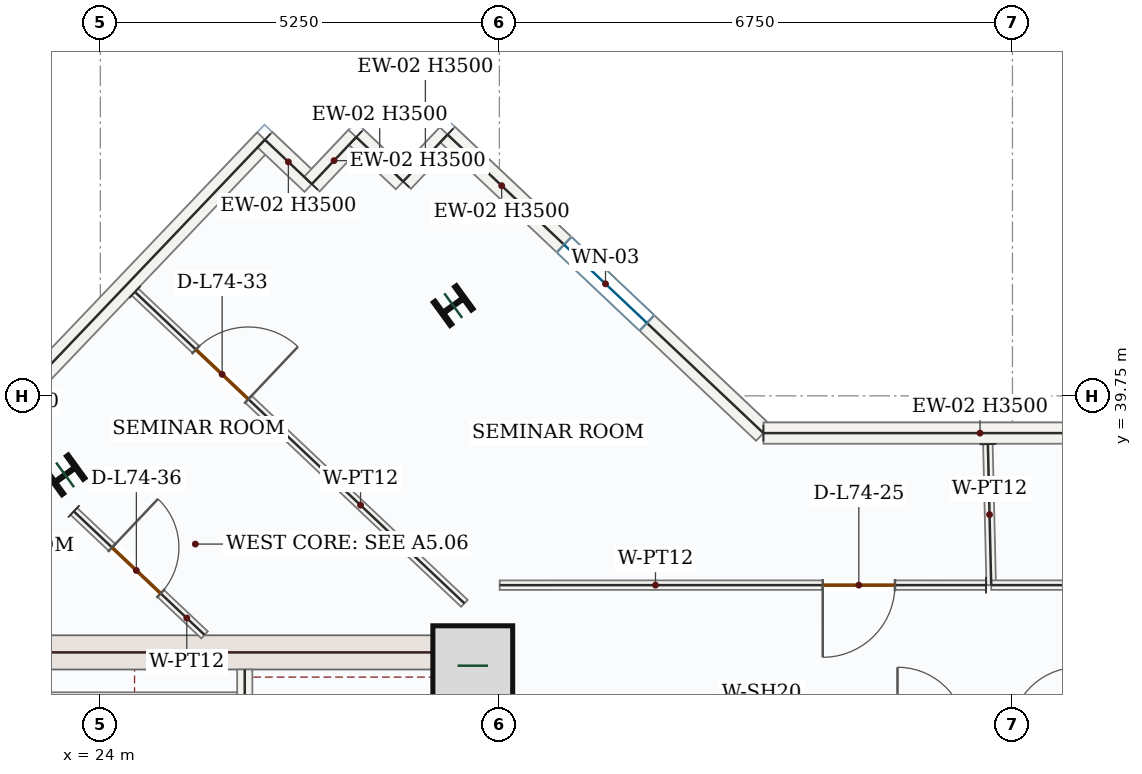
"""IFC4 building model, lengths in metres.
Left out: names, types, materials, properties, quantities, classifications, styles, units other than length and angle.
Written with IfcOpenShell. Run it as: python <this file> out.ifc"""

import sys

from ifc_helpers import new_model, si_unit, direction, frame, frame_2d, origin, origin_2d, place, context, subcontext, project, spatial, rectangle, i_section, extrude, source, transform, mapped, element, fill, save


model = new_model("IFC4")
c1 = context("Model", 3, precision=1e-05, world=origin(), true_north=direction((0.0, 1.0)))
c2 = subcontext(c1, "Body", "Model", "MODEL_VIEW")
j1 = project(units=[si_unit("LENGTHUNIT", "METRE"), si_unit("PLANEANGLEUNIT", "RADIAN")], contexts=[c1])
p1 = place(None, origin())
s1 = spatial("IfcSite", under=j1, at=p1, CompositionType="ELEMENT")
p2 = place(p1, origin())
s2 = spatial("IfcBuilding", under=s1, at=p2, CompositionType="ELEMENT")
p3 = place(p2, frame((0.0, 0.0, 306.6)))
s3 = spatial("IfcBuildingStorey", under=s2, at=p3, CompositionType="ELEMENT", Elevation=306.6)
p4 = place(p3, frame((29.025, 28.05, 0.0), z_axis=(0.0, 0.0, 1.0), x_axis=(0.0, 1.0, 0.0)))
e1 = element("IfcWall", 1, at=p4, inside=s3, PredefinedType="SHEAR", context=c2, shape_type="SweptSolid", body=[
    extrude(rectangle(XDim=8.55, YDim=0.45, at=frame_2d((4.275, 0.0))), origin(), (0.0, 0.0, 1.0), 3.5),
])
p5 = place(p4, frame((1.5, 0.0, 0.0)))
e2 = element("IfcOpeningElement", 2, at=p5, cuts=e1, PredefinedType="OPENING", context=c2, shape_type="SweptSolid", body=[
    extrude(rectangle(XDim=1.1, YDim=2.2, at=frame_2d((0.55, 1.1))), frame((0.0, 0.235, 0.0), z_axis=(0.0, -1.0, 0.0), x_axis=(1.0, 0.0, 0.0)), (0.0, 0.0, 1.0), 0.47),
])
m1 = source(origin(), c2, "Body", "SweptSolid", [
    extrude(rectangle(XDim=7.1, YDim=0.45, at=frame_2d((3.55, 0.0))), origin(), (0.0, 0.0, 1.0), 3.5),
])
p6 = place(p3, frame((21.7, 36.375, 0.0), z_axis=(0.0, 0.0, 1.0), x_axis=(1.0, 0.0, 0.0)))
e3 = element("IfcWall", 3, at=p6, inside=s3, PredefinedType="SHEAR", context=c2, shape_type="MappedRepresentation", body=[
    mapped(m1, transform((0.0, 0.0, 0.0), x_axis=(1.0, 0.0, 0.0), y_axis=(0.0, 1.0, 0.0), z_axis=(0.0, 0.0, 1.0), scale=1.0)),
])
m2 = source(origin(), c2, "Body", "SweptSolid", [
    extrude(rectangle(XDim=1.05, YDim=1.05, at=origin_2d()), origin(), (0.0, 0.0, 1.0), 3.75),
])
p7 = place(p3, frame((28.9, 36.2, 0.0), z_axis=(0.0, 0.0, 1.0), x_axis=(1.0, 0.0, 0.0)))
e4 = element("IfcColumn", 4, at=p7, inside=s3, PredefinedType="COLUMN", context=c2, shape_type="MappedRepresentation", body=[
    mapped(m2, transform((0.0, 0.0, 0.0), x_axis=(1.0, 0.0, 0.0), y_axis=(0.0, 1.0, 0.0), z_axis=(0.0, 0.0, 1.0), scale=1.0)),
])
m3 = source(origin(), c2, "Body", "SweptSolid", [
    extrude(i_section(OverallWidth=0.374, OverallDepth=0.372, WebThickness=0.016, FlangeThickness=0.026, FilletRadius=0.018, at=origin_2d()), origin(), (0.0, 0.0, 1.0), 3.75),
])
for number, where, z_axis, x_axis in (
    (5, (28.643, 40.937, 0.0), (0.0, 0.0, 1.0), (-0.588, 0.809, 0.0)),
    (6, (23.536, 38.711, 0.0), (0.0, 0.0, 1.0), (-0.588, 0.809, 0.0)),
):
    element("IfcColumn", number, at=place(p3, frame(where, z_axis=z_axis, x_axis=x_axis)), inside=s3, PredefinedType="COLUMN", context=c2, shape_type="MappedRepresentation", body=[
        mapped(m3, transform((0.0, 0.0, 0.0), x_axis=(1.0, 0.0, 0.0), y_axis=(0.0, 1.0, 0.0), z_axis=(0.0, 0.0, 1.0), scale=1.0)),
    ])
m4 = source(origin(), c2, "Body", "SweptSolid", [
    extrude(rectangle(XDim=10.47, YDim=0.28, at=frame_2d((5.235, 0.0))), origin(), (0.0, 0.0, 1.0), 3.5),
])
p8 = place(p3, frame((18.94, 35.542, 0.0), z_axis=(0.0, 0.0, 1.0), x_axis=(0.690070788875, 0.723741878256, 0.0)))
e7 = element("IfcWall", 7, at=p8, inside=s3, PredefinedType="SOLIDWALL", context=c2, shape_type="MappedRepresentation", body=[
    mapped(m4, transform((0.0, 0.0, 0.0), x_axis=(1.0, 0.0, 0.0), y_axis=(0.0, 1.0, 0.0), z_axis=(0.0, 0.0, 1.0), scale=1.0)),
])
m5 = source(origin(), c2, "Body", "SweptSolid", [
    extrude(rectangle(XDim=0.85, YDim=0.28, at=frame_2d((0.425, 0.0))), origin(), (0.0, 0.0, 1.0), 3.5),
])
p9 = place(p3, frame((26.165, 43.12, 0.0), z_axis=(0.0, 0.0, 1.0), x_axis=(0.726790047388, -0.686859685101, 0.0)))
e8 = element("IfcWall", 8, at=p9, inside=s3, PredefinedType="SOLIDWALL", context=c2, shape_type="MappedRepresentation", body=[
    mapped(m5, transform((0.0, 0.0, 0.0), x_axis=(1.0, 0.0, 0.0), y_axis=(0.0, 1.0, 0.0), z_axis=(0.0, 0.0, 1.0), scale=1.0)),
])
m6 = source(origin(), c2, "Body", "SweptSolid", [
    extrude(rectangle(XDim=0.85, YDim=0.28, at=frame_2d((0.425, 0.0))), origin(), (0.0, 0.0, 1.0), 3.5),
])
p10 = place(p3, frame((26.783, 42.536, 0.0), z_axis=(0.0, 0.0, 1.0), x_axis=(0.687011382404, 0.726646654466, 0.0)))
e9 = element("IfcWall", 9, at=p10, inside=s3, PredefinedType="SOLIDWALL", context=c2, shape_type="MappedRepresentation", body=[
    mapped(m6, transform((0.0, 0.0, 0.0), x_axis=(1.0, 0.0, 0.0), y_axis=(0.0, 1.0, 0.0), z_axis=(0.0, 0.0, 1.0), scale=1.0)),
])
p11 = place(p3, frame((27.367, 43.154, 0.0), z_axis=(0.0, 0.0, 1.0), x_axis=(0.726790047388, -0.686859685101, 0.0)))
e10 = element("IfcWall", 10, at=p11, inside=s3, PredefinedType="SOLIDWALL", context=c2, shape_type="MappedRepresentation", body=[
    mapped(m5, transform((0.0, 0.0, 0.0), x_axis=(1.0, 0.0, 0.0), y_axis=(0.0, 1.0, 0.0), z_axis=(0.0, 0.0, 1.0), scale=1.0)),
])
p12 = place(p3, frame((27.984, 42.57, 0.0), z_axis=(0.0, 0.0, 1.0), x_axis=(0.687011382404, 0.726646654466, 0.0)))
e11 = element("IfcWall", 11, at=p12, inside=s3, PredefinedType="SOLIDWALL", context=c2, shape_type="MappedRepresentation", body=[
    mapped(m6, transform((0.0, 0.0, 0.0), x_axis=(1.0, 0.0, 0.0), y_axis=(0.0, 1.0, 0.0), z_axis=(0.0, 0.0, 1.0), scale=1.0)),
])
p13 = place(p3, frame((28.568, 43.188, 0.0), z_axis=(0.0, 0.0, 1.0), x_axis=(0.726765623086, -0.686885528382, 0.0)))
e12 = element("IfcWall", 12, at=p13, inside=s3, PredefinedType="SOLIDWALL", context=c2, shape_type="SweptSolid", body=[
    extrude(rectangle(XDim=5.718, YDim=0.28, at=frame_2d((2.859, 0.0))), origin(), (0.0, 0.0, 1.0), 3.5),
])
p14 = place(p13, frame((2.109, 0.0, 0.85)))
e13 = element("IfcOpeningElement", 13, at=p14, cuts=e12, PredefinedType="OPENING", context=c2, shape_type="SweptSolid", body=[
    extrude(rectangle(XDim=1.5, YDim=1.5, at=frame_2d((0.75, 0.75))), frame((0.0, 0.15, 0.0), z_axis=(0.0, -1.0, 0.0), x_axis=(1.0, 0.0, 0.0)), (0.0, 0.0, 1.0), 0.3),
])
m7 = source(origin(), c2, "Body", "SweptSolid", [
    extrude(rectangle(XDim=5.699, YDim=0.28, at=frame_2d((2.85, 0.0))), origin(), (0.0, 0.0, 1.0), 3.5),
])
p15 = place(p3, frame((32.724, 39.26, 0.0), z_axis=(0.0, 0.0, 1.0), x_axis=(1.0, 0.0, 0.0)))
e14 = element("IfcWall", 14, at=p15, inside=s3, PredefinedType="SOLIDWALL", context=c2, shape_type="MappedRepresentation", body=[
    mapped(m7, transform((0.0, 0.0, 0.0), x_axis=(1.0, 0.0, 0.0), y_axis=(0.0, 1.0, 0.0), z_axis=(0.0, 0.0, 1.0), scale=1.0)),
])
p16 = place(p3, frame((25.9, 28.15, 0.0), z_axis=(0.0, 0.0, 1.0), x_axis=(0.0, 1.0, 0.0)))
e15 = element("IfcWall", 15, at=p16, inside=s3, PredefinedType="SOLIDWALL", context=c2, shape_type="SweptSolid", body=[
    extrude(rectangle(XDim=8.0, YDim=0.2, at=frame_2d((4.0, 0.0))), origin(), (0.0, 0.0, 1.0), 3.5),
])
p17 = place(p16, frame((0.4, 0.0, 0.0)))
e16 = element("IfcOpeningElement", 16, at=p17, cuts=e15, PredefinedType="OPENING", context=c2, shape_type="SweptSolid", body=[
    extrude(rectangle(XDim=1.05, YDim=2.15, at=frame_2d((0.525, 1.075))), frame((0.0, 0.11, 0.0), z_axis=(0.0, -1.0, 0.0), x_axis=(1.0, 0.0, 0.0)), (0.0, 0.0, 1.0), 0.22),
])
m8 = source(origin(), c2, "Body", "SweptSolid", [
    extrude(rectangle(XDim=3.25, YDim=0.2, at=frame_2d((1.625, 0.0))), origin(), (0.0, 0.0, 1.0), 3.5),
])
p18 = place(p3, frame((22.55, 35.75, 0.0), z_axis=(0.0, 0.0, 1.0), x_axis=(1.0, 0.0, 0.0)))
e17 = element("IfcWall", 17, at=p18, inside=s3, PredefinedType="SOLIDWALL", context=c2, shape_type="MappedRepresentation", body=[
    mapped(m8, transform((0.0, 0.0, 0.0), x_axis=(1.0, 0.0, 0.0), y_axis=(0.0, 1.0, 0.0), z_axis=(0.0, 0.0, 1.0), scale=1.0)),
])
p19 = place(p3, frame((23.651, 38.231, 0.0), z_axis=(0.0, 0.0, 1.0), x_axis=(0.726735597886, -0.686917295433, 0.0)))
e18 = element("IfcWall", 18, at=p19, inside=s3, PredefinedType="PARTITIONING", context=c2, shape_type="SweptSolid", body=[
    extrude(rectangle(XDim=2.367, YDim=0.125, at=frame_2d((1.183, 0.0))), origin(), (0.0, 0.0, 1.0), 3.5),
])
p20 = place(p19, frame((0.692, 0.0, 0.0)))
e19 = element("IfcOpeningElement", 19, at=p20, cuts=e18, PredefinedType="OPENING", context=c2, shape_type="SweptSolid", body=[
    extrude(rectangle(XDim=0.88, YDim=2.1, at=frame_2d((0.44, 1.05))), frame((0.0, 0.073, 0.0), z_axis=(0.0, -1.0, 0.0), x_axis=(1.0, 0.0, 0.0)), (0.0, 0.0, 1.0), 0.145),
])
p21 = place(p3, frame((24.456, 41.117, 0.0), z_axis=(0.0, 0.0, 1.0), x_axis=(0.726761082497, -0.686890332562, 0.0)))
e20 = element("IfcWall", 20, at=p21, inside=s3, PredefinedType="PARTITIONING", context=c2, shape_type="SweptSolid", body=[
    extrude(rectangle(XDim=5.964, YDim=0.125, at=frame_2d((2.982, 0.0))), origin(), (0.0, 0.0, 1.0), 3.5),
])
p22 = place(p21, frame((1.103, 0.0, 0.0)))
e21 = element("IfcOpeningElement", 21, at=p22, cuts=e20, PredefinedType="OPENING", context=c2, shape_type="SweptSolid", body=[
    extrude(rectangle(XDim=0.95, YDim=2.15, at=frame_2d((0.475, 1.075))), frame((0.0, 0.073, 0.0), z_axis=(0.0, -1.0, 0.0), x_axis=(1.0, 0.0, 0.0)), (0.0, 0.0, 1.0), 0.145),
])
m9 = source(origin(), c2, "Body", "SweptSolid", [
    extrude(rectangle(XDim=1.855, YDim=0.125, at=frame_2d((0.928, 0.0))), origin(), (0.0, 0.0, 1.0), 3.5),
])
p23 = place(p3, frame((35.677, 39.115, 0.0), z_axis=(0.0, 0.0, 1.0), x_axis=(0.023420791501, -0.999725695641, 0.0)))
e22 = element("IfcWall", 22, at=p23, inside=s3, PredefinedType="PARTITIONING", context=c2, shape_type="MappedRepresentation", body=[
    mapped(m9, transform((0.0, 0.0, 0.0), x_axis=(1.0, 0.0, 0.0), y_axis=(0.0, 1.0, 0.0), z_axis=(0.0, 0.0, 1.0), scale=1.0)),
])
p24 = place(p3, frame((35.653, 37.26, 0.0), z_axis=(0.0, 0.0, 1.0), x_axis=(-0.999999997089, -7.6303842e-05, 0.0)))
e23 = element("IfcWall", 23, at=p24, inside=s3, PredefinedType="PARTITIONING", context=c2, shape_type="SweptSolid", body=[
    extrude(rectangle(XDim=6.399, YDim=0.125, at=frame_2d((3.2, 0.0))), origin(), (0.0, 0.0, 1.0), 3.5),
])
p25 = place(p24, frame((1.199, 0.0, 0.0)))
e24 = element("IfcOpeningElement", 24, at=p25, cuts=e23, PredefinedType="OPENING", context=c2, shape_type="SweptSolid", body=[
    extrude(rectangle(XDim=0.95, YDim=2.15, at=frame_2d((0.475, 1.075))), frame((0.0, 0.073, 0.0), z_axis=(0.0, -1.0, 0.0), x_axis=(1.0, 0.0, 0.0)), (0.0, 0.0, 1.0), 0.145),
])
p26 = place(p3, frame((42.601, 37.26, 0.0), z_axis=(0.0, 0.0, 1.0), x_axis=(-1.0, 0.0, 0.0)))
e25 = element("IfcWall", 25, at=p26, inside=s3, PredefinedType="PARTITIONING", context=c2, shape_type="SweptSolid", body=[
    extrude(rectangle(XDim=6.881, YDim=0.125, at=frame_2d((3.44, 0.0))), origin(), (0.0, 0.0, 1.0), 3.5),
])
p27 = place(p26, frame((4.626, 0.0, 0.0)))
e26 = element("IfcOpeningElement", 26, at=p27, cuts=e25, PredefinedType="OPENING", context=c2, shape_type="SweptSolid", body=[
    extrude(rectangle(XDim=0.95, YDim=2.15, at=frame_2d((0.475, 1.075))), frame((0.0, 0.073, 0.0), z_axis=(0.0, -1.0, 0.0), x_axis=(1.0, 0.0, 0.0)), (0.0, 0.0, 1.0), 0.145),
])
m10 = source(origin(), c2, "Body", "SweptSolid", [
    extrude(rectangle(XDim=1.5, YDim=1.5, at=frame_2d((0.75, 0.75))), frame((0.0, 0.03, 0.0), z_axis=(0.0, -1.0, 0.0), x_axis=(1.0, 0.0, 0.0)), (0.0, 0.0, 1.0), 0.06),
])
p28 = place(p14, origin())
e27 = element("IfcWindow", 27, at=p28, inside=s3, PartitioningType="SINGLE_PANEL", PredefinedType="WINDOW", context=c2, shape_type="MappedRepresentation", body=[
    mapped(m10, transform((0.0, 0.0, 0.0), x_axis=(1.0, 0.0, 0.0), y_axis=(0.0, 1.0, 0.0), z_axis=(0.0, 0.0, 1.0), scale=1.0)),
])
fill(e13, e27)
m11 = source(origin(), c2, "Body", "SweptSolid", [
    extrude(rectangle(XDim=0.95, YDim=2.15, at=frame_2d((0.475, 1.075))), frame((0.0, 0.025, 0.0), z_axis=(0.0, -1.0, 0.0), x_axis=(1.0, 0.0, 0.0)), (0.0, 0.0, 1.0), 0.05),
])
p29 = place(p25, origin())
e28 = element("IfcDoor", 28, at=p29, inside=s3, OperationType="SINGLE_SWING_RIGHT", PredefinedType="DOOR", context=c2, shape_type="MappedRepresentation", body=[
    mapped(m11, transform((0.0, 0.0, 0.0), x_axis=(1.0, 0.0, 0.0), y_axis=(0.0, 1.0, 0.0), z_axis=(0.0, 0.0, 1.0), scale=1.0)),
])
fill(e24, e28)
p30 = place(p22, origin())
e29 = element("IfcDoor", 29, at=p30, inside=s3, OperationType="SINGLE_SWING_RIGHT", PredefinedType="DOOR", context=c2, shape_type="MappedRepresentation", body=[
    mapped(m11, transform((0.0, 0.0, 0.0), x_axis=(1.0, 0.0, 0.0), y_axis=(0.0, 1.0, 0.0), z_axis=(0.0, 0.0, 1.0), scale=1.0)),
])
fill(e21, e29)
m12 = source(origin(), c2, "Body", "SweptSolid", [
    extrude(rectangle(XDim=0.88, YDim=2.1, at=frame_2d((0.44, 1.05))), frame((0.0, 0.025, 0.0), z_axis=(0.0, -1.0, 0.0), x_axis=(1.0, 0.0, 0.0)), (0.0, 0.0, 1.0), 0.05),
])
p31 = place(p20, origin())
e30 = element("IfcDoor", 30, at=p31, inside=s3, OperationType="SINGLE_SWING_LEFT", PredefinedType="DOOR", context=c2, shape_type="MappedRepresentation", body=[
    mapped(m12, transform((0.0, 0.0, 0.0), x_axis=(1.0, 0.0, 0.0), y_axis=(0.0, 1.0, 0.0), z_axis=(0.0, 0.0, 1.0), scale=1.0)),
])
fill(e19, e30)
save(model, sys.argv[1])
